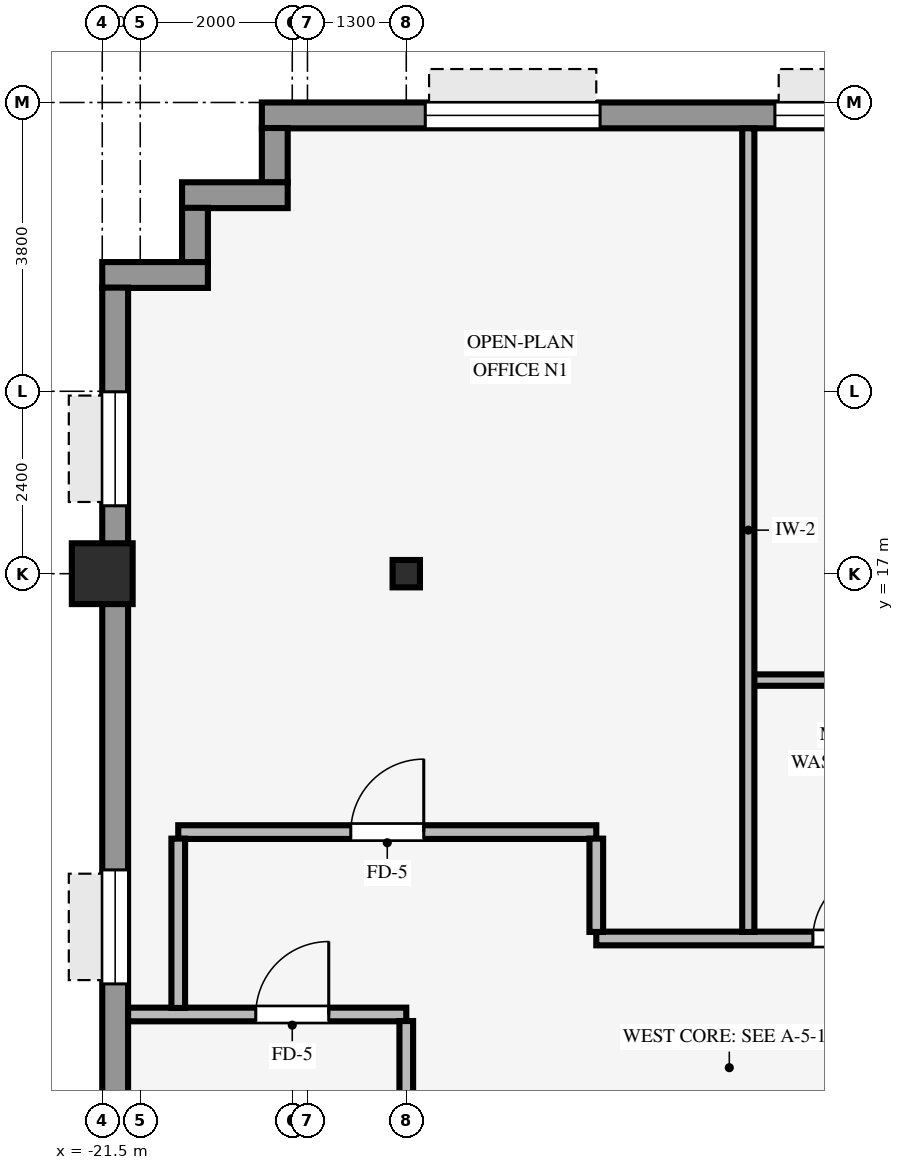
"""IFC4 building model, lengths in metres.
Left out: names, types, materials, properties, quantities, classifications, styles, units other than length and angle.
Written with IfcOpenShell. Run it as: python <this file> out.ifc"""

import sys

from ifc_helpers import new_model, si_unit, direction, frame, frame_2d, origin, origin_2d, place, context, subcontext, project, spatial, rectangle, hollow_rectangle, i_section, extrude, source, transform, mapped, element, fill, save


model = new_model("IFC4")
c1 = context("Model", 3, precision=1e-05, world=origin(), true_north=direction((0.0, 1.0)))
c2 = subcontext(c1, "Body", "Model", "MODEL_VIEW")
j1 = project(units=[si_unit("LENGTHUNIT", "METRE"), si_unit("PLANEANGLEUNIT", "RADIAN")], contexts=[c1])
p1 = place(None, origin())
s1 = spatial("IfcSite", under=j1, at=p1, CompositionType="ELEMENT")
p2 = place(p1, origin())
s2 = spatial("IfcBuilding", under=s1, at=p2, CompositionType="ELEMENT")
p3 = place(p2, frame((0.0, 0.0, 75.05)))
s3 = spatial("IfcBuildingStorey", under=s2, at=p3, CompositionType="ELEMENT", Elevation=75.05)
p4 = place(p3, frame((-21.5, 17.0, 0.0), z_axis=(0.0, 0.0, 1.0), x_axis=(1.0, 0.0, 0.0)))
e1 = element("IfcColumn", 1, at=p4, inside=s3, PredefinedType="COLUMN", context=c2, shape_type="SweptSolid", body=[
    extrude(hollow_rectangle(XDim=0.8, YDim=0.8, WallThickness=0.055, InnerFilletRadius=0.055, OuterFilletRadius=0.11, at=origin_2d()), origin(), (0.0, 0.0, 1.0), 3.37),
])
p5 = place(p3, frame((-17.5, 17.0, 0.0), z_axis=(0.0, 0.0, 1.0), x_axis=(1.0, 0.0, 0.0)))
e2 = element("IfcColumn", 2, at=p5, inside=s3, PredefinedType="COLUMN", context=c2, shape_type="SweptSolid", body=[
    extrude(i_section(OverallWidth=0.36, OverallDepth=0.36, WebThickness=0.021, FlangeThickness=0.021, FilletRadius=0.018, at=origin_2d()), origin(), (0.0, 0.0, 1.0), 3.37),
])
p6 = place(p3, frame((-19.4, 23.03, 0.0), z_axis=(0.0, 0.0, 1.0), x_axis=(1.0, 0.0, 0.0)))
e3 = element("IfcWall", 3, at=p6, inside=s3, PredefinedType="STANDARD", context=c2, shape_type="SweptSolid", body=[
    extrude(rectangle(XDim=38.8, YDim=0.34, at=frame_2d((19.4, 0.0))), origin(), (0.0, 0.0, 1.0), 2.705),
])
p7 = place(p6, frame((2.15, 0.0, 0.8)))
e4 = element("IfcOpeningElement", 4, at=p7, cuts=e3, PredefinedType="OPENING", context=c2, shape_type="SweptSolid", body=[
    extrude(rectangle(XDim=2.3, YDim=1.62, at=frame_2d((1.15, 0.81))), frame((0.0, 0.18, 0.0), z_axis=(0.0, -1.0, 0.0), x_axis=(1.0, 0.0, 0.0)), (0.0, 0.0, 1.0), 0.36),
])
p8 = place(p6, frame((6.75, 0.0, 0.8)))
e5 = element("IfcOpeningElement", 5, at=p8, cuts=e3, PredefinedType="OPENING", context=c2, shape_type="SweptSolid", body=[
    extrude(rectangle(XDim=2.3, YDim=1.62, at=frame_2d((1.15, 0.81))), frame((0.0, 0.18, 0.0), z_axis=(0.0, -1.0, 0.0), x_axis=(1.0, 0.0, 0.0)), (0.0, 0.0, 1.0), 0.36),
])
p9 = place(p6, frame((11.35, 0.0, 0.8)))
e6 = element("IfcOpeningElement", 6, at=p9, cuts=e3, PredefinedType="OPENING", context=c2, shape_type="SweptSolid", body=[
    extrude(rectangle(XDim=2.3, YDim=1.62, at=frame_2d((1.15, 0.81))), frame((0.0, 0.18, 0.0), z_axis=(0.0, -1.0, 0.0), x_axis=(1.0, 0.0, 0.0)), (0.0, 0.0, 1.0), 0.36),
])
p10 = place(p6, frame((15.95, 0.0, 0.8)))
e7 = element("IfcOpeningElement", 7, at=p10, cuts=e3, PredefinedType="OPENING", context=c2, shape_type="SweptSolid", body=[
    extrude(rectangle(XDim=2.3, YDim=1.62, at=frame_2d((1.15, 0.81))), frame((0.0, 0.18, 0.0), z_axis=(0.0, -1.0, 0.0), x_axis=(1.0, 0.0, 0.0)), (0.0, 0.0, 1.0), 0.36),
])
p11 = place(p6, frame((20.55, 0.0, 0.8)))
e8 = element("IfcOpeningElement", 8, at=p11, cuts=e3, PredefinedType="OPENING", context=c2, shape_type="SweptSolid", body=[
    extrude(rectangle(XDim=2.3, YDim=1.62, at=frame_2d((1.15, 0.81))), frame((0.0, 0.18, 0.0), z_axis=(0.0, -1.0, 0.0), x_axis=(1.0, 0.0, 0.0)), (0.0, 0.0, 1.0), 0.36),
])
p12 = place(p6, frame((25.15, 0.0, 0.8)))
e9 = element("IfcOpeningElement", 9, at=p12, cuts=e3, PredefinedType="OPENING", context=c2, shape_type="SweptSolid", body=[
    extrude(rectangle(XDim=2.3, YDim=1.62, at=frame_2d((1.15, 0.81))), frame((0.0, 0.18, 0.0), z_axis=(0.0, -1.0, 0.0), x_axis=(1.0, 0.0, 0.0)), (0.0, 0.0, 1.0), 0.36),
])
p13 = place(p6, frame((31.1, 0.0, 0.8)))
e10 = element("IfcOpeningElement", 10, at=p13, cuts=e3, PredefinedType="OPENING", context=c2, shape_type="SweptSolid", body=[
    extrude(rectangle(XDim=2.3, YDim=1.62, at=frame_2d((1.15, 0.81))), frame((0.0, 0.18, 0.0), z_axis=(0.0, -1.0, 0.0), x_axis=(1.0, 0.0, 0.0)), (0.0, 0.0, 1.0), 0.36),
])
p14 = place(p6, frame((34.35, 0.0, 0.8)))
e11 = element("IfcOpeningElement", 11, at=p14, cuts=e3, PredefinedType="OPENING", context=c2, shape_type="SweptSolid", body=[
    extrude(rectangle(XDim=2.3, YDim=1.62, at=frame_2d((1.15, 0.81))), frame((0.0, 0.18, 0.0), z_axis=(0.0, -1.0, 0.0), x_axis=(1.0, 0.0, 0.0)), (0.0, 0.0, 1.0), 0.36),
])
p15 = place(p3, frame((-19.23, 22.146, 0.0), z_axis=(0.0, 0.0, 1.0), x_axis=(0.0, 1.0, 0.0)))
e12 = element("IfcWall", 12, at=p15, inside=s3, PredefinedType="STANDARD", context=c2, shape_type="SweptSolid", body=[
    extrude(rectangle(XDim=0.718, YDim=0.34, at=frame_2d((0.359, 0.0))), origin(), (0.0, 0.0, 1.0), 3.36),
])
p16 = place(p3, frame((-20.45, 21.98, 0.0), z_axis=(0.0, 0.0, 1.0), x_axis=(1.0, 0.0, 0.0)))
e13 = element("IfcWall", 13, at=p16, inside=s3, PredefinedType="STANDARD", context=c2, shape_type="SweptSolid", body=[
    extrude(rectangle(XDim=1.39, YDim=0.34, at=frame_2d((0.695, 0.0))), origin(), (0.0, 0.0, 1.0), 3.36),
])
p17 = place(p3, frame((-20.28, 21.096, 0.0), z_axis=(0.0, 0.0, 1.0), x_axis=(0.0, 1.0, 0.0)))
e14 = element("IfcWall", 14, at=p17, inside=s3, PredefinedType="STANDARD", context=c2, shape_type="SweptSolid", body=[
    extrude(rectangle(XDim=0.718, YDim=0.34, at=frame_2d((0.359, 0.0))), origin(), (0.0, 0.0, 1.0), 3.36),
])
p18 = place(p3, frame((-21.5, 20.93, 0.0), z_axis=(0.0, 0.0, 1.0), x_axis=(1.0, 0.0, 0.0)))
e15 = element("IfcWall", 15, at=p18, inside=s3, PredefinedType="STANDARD", context=c2, shape_type="SweptSolid", body=[
    extrude(rectangle(XDim=1.39, YDim=0.34, at=frame_2d((0.695, 0.0))), origin(), (0.0, 0.0, 1.0), 3.36),
])
p19 = place(p3, frame((-21.33, -20.764, 0.0), z_axis=(0.0, 0.0, 1.0), x_axis=(0.0, 1.0, 0.0)))
e16 = element("IfcWall", 16, at=p19, inside=s3, PredefinedType="STANDARD", context=c2, shape_type="SweptSolid", body=[
    extrude(rectangle(XDim=41.528, YDim=0.34, at=frame_2d((20.764, 0.0))), origin(), (0.0, 0.0, 1.0), 2.705),
])
p20 = place(p19, frame((15.464, 0.0, 0.0)))
e17 = element("IfcOpeningElement", 17, at=p20, cuts=e16, PredefinedType="OPENING", context=c2, shape_type="SweptSolid", body=[
    extrude(rectangle(XDim=0.98, YDim=2.15, at=frame_2d((0.49, 1.075))), frame((0.0, 0.18, 0.0), z_axis=(0.0, -1.0, 0.0), x_axis=(1.0, 0.0, 0.0)), (0.0, 0.0, 1.0), 0.36),
])
p21 = place(p19, frame((1.371, 0.0, 0.8)))
e18 = element("IfcOpeningElement", 18, at=p21, cuts=e16, PredefinedType="OPENING", context=c2, shape_type="SweptSolid", body=[
    extrude(rectangle(XDim=1.5, YDim=1.6, at=frame_2d((0.75, 0.8))), frame((0.0, 0.18, 0.0), z_axis=(0.0, -1.0, 0.0), x_axis=(1.0, 0.0, 0.0)), (0.0, 0.0, 1.0), 0.36),
])
p22 = place(p19, frame((7.662, 0.0, 0.8)))
e19 = element("IfcOpeningElement", 19, at=p22, cuts=e16, PredefinedType="OPENING", context=c2, shape_type="SweptSolid", body=[
    extrude(rectangle(XDim=1.5, YDim=1.6, at=frame_2d((0.75, 0.8))), frame((0.0, 0.18, 0.0), z_axis=(0.0, -1.0, 0.0), x_axis=(1.0, 0.0, 0.0)), (0.0, 0.0, 1.0), 0.36),
])
p23 = place(p19, frame((12.603, 0.0, 0.8)))
e20 = element("IfcOpeningElement", 20, at=p23, cuts=e16, PredefinedType="OPENING", context=c2, shape_type="SweptSolid", body=[
    extrude(rectangle(XDim=1.5, YDim=1.6, at=frame_2d((0.75, 0.8))), frame((0.0, 0.18, 0.0), z_axis=(0.0, -1.0, 0.0), x_axis=(1.0, 0.0, 0.0)), (0.0, 0.0, 1.0), 0.36),
])
p24 = place(p19, frame((22.485, 0.0, 0.8)))
e21 = element("IfcOpeningElement", 21, at=p24, cuts=e16, PredefinedType="OPENING", context=c2, shape_type="SweptSolid", body=[
    extrude(rectangle(XDim=1.5, YDim=1.6, at=frame_2d((0.75, 0.8))), frame((0.0, 0.18, 0.0), z_axis=(0.0, -1.0, 0.0), x_axis=(1.0, 0.0, 0.0)), (0.0, 0.0, 1.0), 0.36),
])
p25 = place(p19, frame((27.426, 0.0, 0.8)))
e22 = element("IfcOpeningElement", 22, at=p25, cuts=e16, PredefinedType="OPENING", context=c2, shape_type="SweptSolid", body=[
    extrude(rectangle(XDim=1.5, YDim=1.6, at=frame_2d((0.75, 0.8))), frame((0.0, 0.18, 0.0), z_axis=(0.0, -1.0, 0.0), x_axis=(1.0, 0.0, 0.0)), (0.0, 0.0, 1.0), 0.36),
])
p26 = place(p19, frame((32.366, 0.0, 0.8)))
e23 = element("IfcOpeningElement", 23, at=p26, cuts=e16, PredefinedType="OPENING", context=c2, shape_type="SweptSolid", body=[
    extrude(rectangle(XDim=1.5, YDim=1.6, at=frame_2d((0.75, 0.8))), frame((0.0, 0.18, 0.0), z_axis=(0.0, -1.0, 0.0), x_axis=(1.0, 0.0, 0.0)), (0.0, 0.0, 1.0), 0.36),
])
p27 = place(p19, frame((38.657, 0.0, 0.8)))
e24 = element("IfcOpeningElement", 24, at=p27, cuts=e16, PredefinedType="OPENING", context=c2, shape_type="SweptSolid", body=[
    extrude(rectangle(XDim=1.5, YDim=1.6, at=frame_2d((0.75, 0.8))), frame((0.0, 0.18, 0.0), z_axis=(0.0, -1.0, 0.0), x_axis=(1.0, 0.0, 0.0)), (0.0, 0.0, 1.0), 0.36),
])
p28 = place(p3, frame((-21.16, 11.2, 0.0), z_axis=(0.0, 0.0, 1.0), x_axis=(1.0, 0.0, 0.0)))
e25 = element("IfcWall", 25, at=p28, inside=s3, PredefinedType="PARTITIONING", context=c2, shape_type="SweptSolid", body=[
    extrude(rectangle(XDim=3.66, YDim=0.18, at=frame_2d((1.83, 0.0))), origin(), (0.0, 0.0, 1.0), 3.36),
])
p29 = place(p28, frame((1.68, 0.0, 0.0)))
e26 = element("IfcOpeningElement", 26, at=p29, cuts=e25, PredefinedType="OPENING", context=c2, shape_type="SweptSolid", body=[
    extrude(rectangle(XDim=0.96, YDim=2.1, at=frame_2d((0.48, 1.05))), frame((0.0, 0.1, 0.0), z_axis=(0.0, -1.0, 0.0), x_axis=(1.0, 0.0, 0.0)), (0.0, 0.0, 1.0), 0.2),
])
p30 = place(p3, frame((-15.0, 12.2, 0.0), z_axis=(0.0, 0.0, 1.0), x_axis=(1.0, 0.0, 0.0)))
e27 = element("IfcWall", 27, at=p30, inside=s3, PredefinedType="PARTITIONING", context=c2, shape_type="SweptSolid", body=[
    extrude(rectangle(XDim=30.0, YDim=0.18, at=frame_2d((15.0, 0.0))), origin(), (0.0, 0.0, 1.0), 3.36),
])
p31 = place(p30, frame((22.085, 0.0, 0.0)))
e28 = element("IfcOpeningElement", 28, at=p31, cuts=e27, PredefinedType="OPENING", context=c2, shape_type="SweptSolid", body=[
    extrude(rectangle(XDim=0.96, YDim=2.1, at=frame_2d((0.48, 1.05))), frame((0.0, 0.1, 0.0), z_axis=(0.0, -1.0, 0.0), x_axis=(1.0, 0.0, 0.0)), (0.0, 0.0, 1.0), 0.2),
])
p32 = place(p30, frame((16.175, 0.0, 0.0)))
e29 = element("IfcOpeningElement", 29, at=p32, cuts=e27, PredefinedType="OPENING", context=c2, shape_type="SweptSolid", body=[
    extrude(rectangle(XDim=0.96, YDim=2.1, at=frame_2d((0.48, 1.05))), frame((0.0, 0.1, 0.0), z_axis=(0.0, -1.0, 0.0), x_axis=(1.0, 0.0, 0.0)), (0.0, 0.0, 1.0), 0.2),
])
p33 = place(p30, frame((5.45, 0.0, 0.0)))
e30 = element("IfcOpeningElement", 30, at=p33, cuts=e27, PredefinedType="OPENING", context=c2, shape_type="SweptSolid", body=[
    extrude(rectangle(XDim=0.9, YDim=2.1, at=frame_2d((0.45, 1.05))), frame((0.0, 0.1, 0.0), z_axis=(0.0, -1.0, 0.0), x_axis=(1.0, 0.0, 0.0)), (0.0, 0.0, 1.0), 0.2),
])
p34 = place(p30, frame((2.85, 0.0, 0.0)))
e31 = element("IfcOpeningElement", 31, at=p34, cuts=e27, PredefinedType="OPENING", context=c2, shape_type="SweptSolid", body=[
    extrude(rectangle(XDim=0.9, YDim=2.1, at=frame_2d((0.45, 1.05))), frame((0.0, 0.1, 0.0), z_axis=(0.0, -1.0, 0.0), x_axis=(1.0, 0.0, 0.0)), (0.0, 0.0, 1.0), 0.2),
])
p35 = place(p30, frame((12.52, 0.0, 0.0)))
e32 = element("IfcOpeningElement", 32, at=p35, cuts=e27, PredefinedType="OPENING", context=c2, shape_type="SweptSolid", body=[
    extrude(rectangle(XDim=0.96, YDim=2.1, at=frame_2d((0.48, 1.05))), frame((0.0, 0.1, 0.0), z_axis=(0.0, -1.0, 0.0), x_axis=(1.0, 0.0, 0.0)), (0.0, 0.0, 1.0), 0.2),
])
p36 = place(p30, frame((7.95, 0.0, 0.0)))
e33 = element("IfcOpeningElement", 33, at=p36, cuts=e27, PredefinedType="OPENING", context=c2, shape_type="SweptSolid", body=[
    extrude(rectangle(XDim=0.9, YDim=2.1, at=frame_2d((0.45, 1.05))), frame((0.0, 0.1, 0.0), z_axis=(0.0, -1.0, 0.0), x_axis=(1.0, 0.0, 0.0)), (0.0, 0.0, 1.0), 0.2),
])
p37 = place(p3, frame((-20.5, 13.6, 0.0), z_axis=(0.0, 0.0, 1.0), x_axis=(1.0, 0.0, 0.0)))
e34 = element("IfcWall", 34, at=p37, inside=s3, PredefinedType="PARTITIONING", context=c2, shape_type="SweptSolid", body=[
    extrude(rectangle(XDim=5.5, YDim=0.18, at=frame_2d((2.75, 0.0))), origin(), (0.0, 0.0, 1.0), 2.942),
])
p38 = place(p37, frame((2.27, 0.0, 0.0)))
e35 = element("IfcOpeningElement", 35, at=p38, cuts=e34, PredefinedType="OPENING", context=c2, shape_type="SweptSolid", body=[
    extrude(rectangle(XDim=0.96, YDim=2.1, at=frame_2d((0.48, 1.05))), frame((0.0, 0.1, 0.0), z_axis=(0.0, -1.0, 0.0), x_axis=(1.0, 0.0, 0.0)), (0.0, 0.0, 1.0), 0.2),
])
p39 = place(p3, frame((-12.929, 15.6, 0.0), z_axis=(0.0, 0.0, 1.0), x_axis=(1.0, 0.0, 0.0)))
e36 = element("IfcWall", 36, at=p39, inside=s3, PredefinedType="PARTITIONING", context=c2, shape_type="SweptSolid", body=[
    extrude(rectangle(XDim=7.529, YDim=0.15, at=frame_2d((3.765, 0.0))), origin(), (0.0, 0.0, 1.0), 3.36),
])
p40 = place(p3, frame((-20.5, 11.286, 0.0), z_axis=(0.0, 0.0, 1.0), x_axis=(0.0, 1.0, 0.0)))
e37 = element("IfcWall", 37, at=p40, inside=s3, PredefinedType="PARTITIONING", context=c2, shape_type="SweptSolid", body=[
    extrude(rectangle(XDim=2.228, YDim=0.18, at=frame_2d((1.114, 0.0))), origin(), (0.0, 0.0, 1.0), 3.36),
])
p41 = place(p3, frame((-17.5, 10.146, 0.0), z_axis=(0.0, 0.0, 1.0), x_axis=(0.0, 1.0, 0.0)))
e38 = element("IfcWall", 38, at=p41, inside=s3, PredefinedType="PARTITIONING", context=c2, shape_type="SweptSolid", body=[
    extrude(rectangle(XDim=0.968, YDim=0.18, at=frame_2d((0.484, 0.0))), origin(), (0.0, 0.0, 1.0), 2.738),
])
p42 = place(p3, frame((-15.0, 12.286, 0.0), z_axis=(0.0, 0.0, 1.0), x_axis=(0.0, 1.0, 0.0)))
e39 = element("IfcWall", 39, at=p42, inside=s3, PredefinedType="PARTITIONING", context=c2, shape_type="SweptSolid", body=[
    extrude(rectangle(XDim=1.228, YDim=0.18, at=frame_2d((0.614, 0.0))), origin(), (0.0, 0.0, 1.0), 3.36),
])
p43 = place(p3, frame((-13.0, 12.286, 0.0), z_axis=(0.0, 0.0, 1.0), x_axis=(0.0, 1.0, 0.0)))
e40 = element("IfcWall", 40, at=p43, inside=s3, PredefinedType="PARTITIONING", context=c2, shape_type="SweptSolid", body=[
    extrude(rectangle(XDim=10.574, YDim=0.16, at=frame_2d((5.287, 0.0))), origin(), (0.0, 0.0, 1.0), 3.36),
])
m1 = source(origin(), c2, "Body", "SweptSolid", [
    extrude(rectangle(XDim=2.3, YDim=1.62, at=frame_2d((1.15, 0.81))), frame((0.0, 0.03, 0.0), z_axis=(0.0, -1.0, 0.0), x_axis=(1.0, 0.0, 0.0)), (0.0, 0.0, 1.0), 0.06),
])
p44 = place(p7, origin())
e41 = element("IfcWindow", 41, at=p44, inside=s3, PartitioningType="SINGLE_PANEL", PredefinedType="WINDOW", context=c2, shape_type="MappedRepresentation", body=[
    mapped(m1, transform((0.0, 0.0, 0.0), scale=1.0)),
])
fill(e4, e41)
p45 = place(p8, origin())
e42 = element("IfcWindow", 42, at=p45, inside=s3, PartitioningType="SINGLE_PANEL", PredefinedType="WINDOW", context=c2, shape_type="MappedRepresentation", body=[
    mapped(m1, transform((0.0, 0.0, 0.0), scale=1.0)),
])
fill(e5, e42)
m2 = source(origin(), c2, "Body", "SweptSolid", [
    extrude(rectangle(XDim=1.5, YDim=1.6, at=frame_2d((0.75, 0.8))), frame((0.0, 0.03, 0.0), z_axis=(0.0, -1.0, 0.0), x_axis=(1.0, 0.0, 0.0)), (0.0, 0.0, 1.0), 0.06),
])
p46 = place(p26, origin())
e43 = element("IfcWindow", 43, at=p46, inside=s3, PartitioningType="SINGLE_PANEL", PredefinedType="WINDOW", context=c2, shape_type="MappedRepresentation", body=[
    mapped(m2, transform((0.0, 0.0, 0.0), scale=1.0)),
])
fill(e23, e43)
p47 = place(p27, origin())
e44 = element("IfcWindow", 44, at=p47, inside=s3, PartitioningType="SINGLE_PANEL", PredefinedType="WINDOW", context=c2, shape_type="MappedRepresentation", body=[
    mapped(m2, transform((0.0, 0.0, 0.0), scale=1.0)),
])
fill(e24, e44)
m3 = source(origin(), c2, "Body", "SweptSolid", [
    extrude(rectangle(XDim=0.96, YDim=2.1, at=frame_2d((0.48, 1.05))), frame((0.0, 0.025, 0.0), z_axis=(0.0, -1.0, 0.0), x_axis=(1.0, 0.0, 0.0)), (0.0, 0.0, 1.0), 0.05),
])
p48 = place(p38, origin())
e45 = element("IfcDoor", 45, at=p48, inside=s3, OperationType="SINGLE_SWING_RIGHT", PredefinedType="DOOR", context=c2, shape_type="MappedRepresentation", body=[
    mapped(m3, transform((0.0, 0.0, 0.0), scale=1.0)),
])
fill(e35, e45)
p49 = place(p29, origin())
e46 = element("IfcDoor", 46, at=p49, inside=s3, OperationType="SINGLE_SWING_RIGHT", PredefinedType="DOOR", context=c2, shape_type="MappedRepresentation", body=[
    mapped(m3, transform((0.0, 0.0, 0.0), scale=1.0)),
])
fill(e26, e46)
m4 = source(origin(), c2, "Body", "SweptSolid", [
    extrude(rectangle(XDim=0.9, YDim=2.1, at=frame_2d((0.45, 1.05))), frame((0.0, 0.025, 0.0), z_axis=(0.0, -1.0, 0.0), x_axis=(1.0, 0.0, 0.0)), (0.0, 0.0, 1.0), 0.05),
])
p50 = place(p34, origin())
e47 = element("IfcDoor", 47, at=p50, inside=s3, OperationType="SINGLE_SWING_RIGHT", PredefinedType="DOOR", context=c2, shape_type="MappedRepresentation", body=[
    mapped(m4, transform((0.0, 0.0, 0.0), scale=1.0)),
])
fill(e31, e47)
save(model, sys.argv[1])
